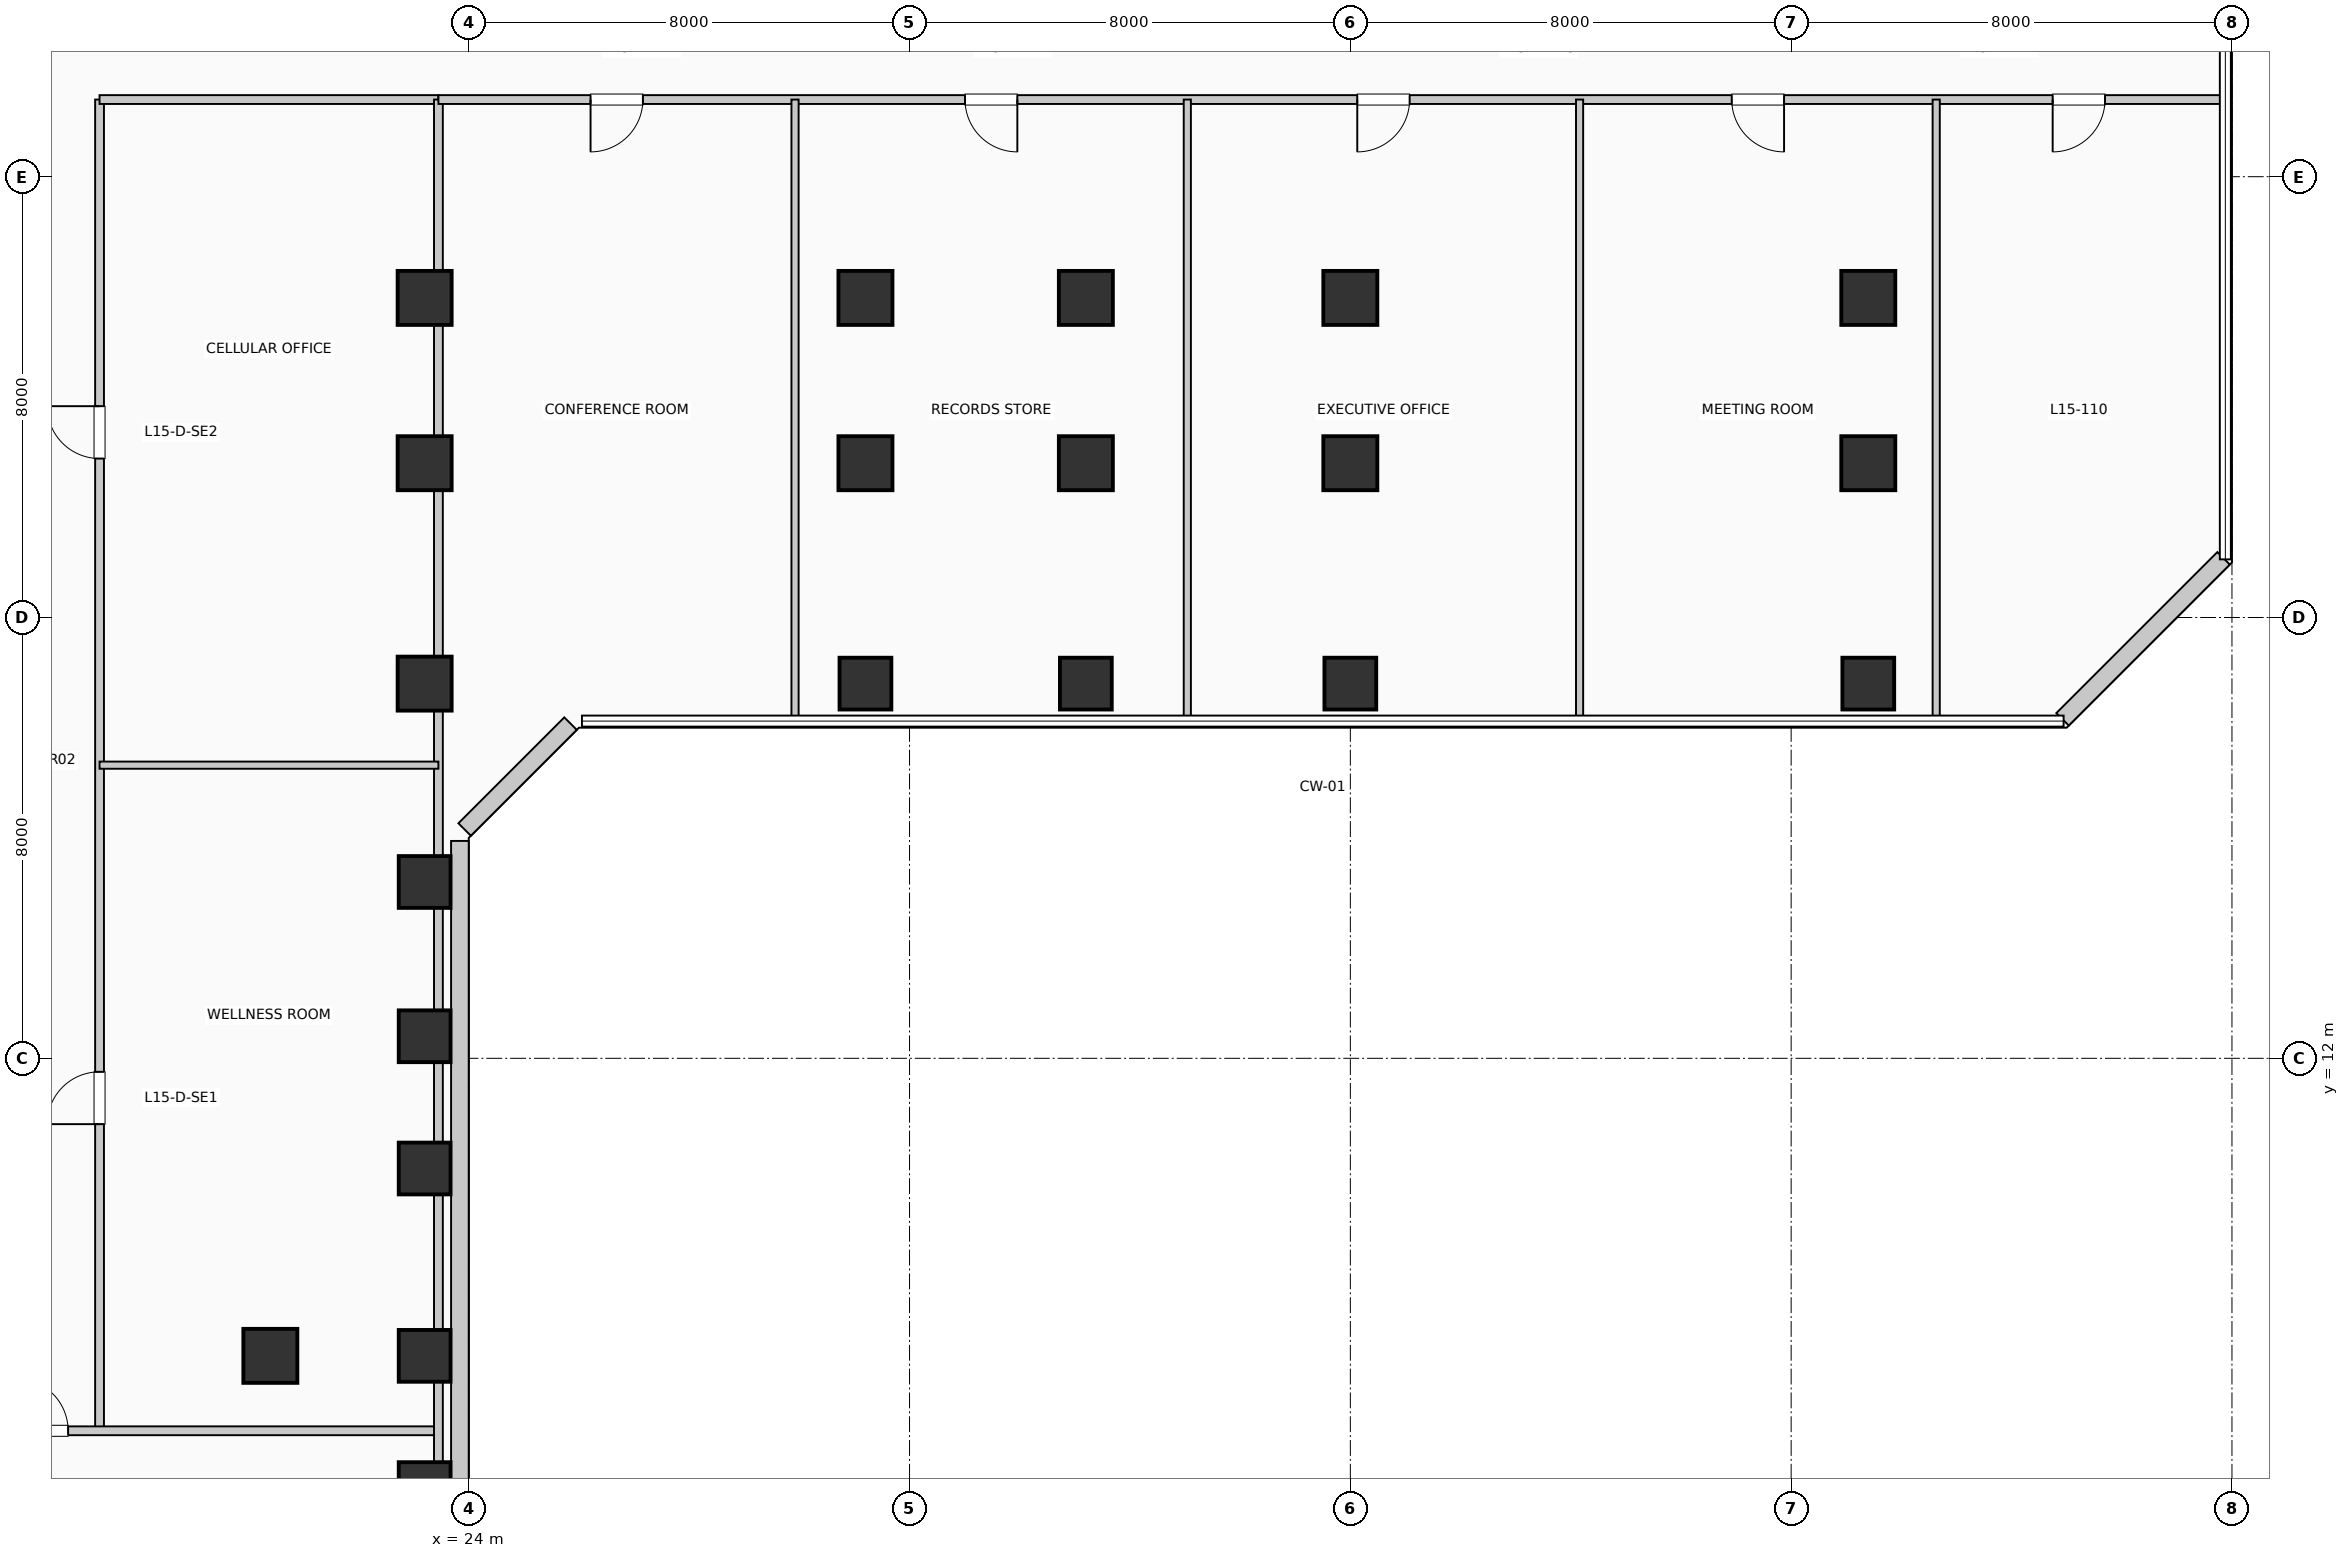
"""IFC4 building model, lengths in metres.
Left out: names, types, materials, properties, quantities, classifications, styles, units other than length and angle.
Written with IfcOpenShell. Run it as: python <this file> out.ifc"""

import sys

from ifc_helpers import new_model, si_unit, direction, frame, frame_2d, origin, origin_2d, place, context, subcontext, project, spatial, rectangle, extrude, element, fill, save


model = new_model("IFC4")
c1 = context("Model", 3, precision=1e-05, world=origin(), true_north=direction((0.0, 1.0)))
c2 = subcontext(c1, "Body", "Model", "MODEL_VIEW")
j1 = project(units=[si_unit("LENGTHUNIT", "METRE"), si_unit("PLANEANGLEUNIT", "RADIAN")], contexts=[c1])
p1 = place(None, origin())
s1 = spatial("IfcSite", under=j1, at=p1, CompositionType="ELEMENT")
p2 = place(p1, origin())
s2 = spatial("IfcBuilding", under=s1, at=p2, CompositionType="ELEMENT")
p3 = place(p2, frame((0.0, 0.0, 66.0)))
s3 = spatial("IfcBuildingStorey", under=s2, at=p3, CompositionType="ELEMENT", Elevation=66.0)
p4 = place(p3, frame((20.4, 6.6, 0.0), z_axis=(0.0, 0.0, 1.0), x_axis=(1.0, 0.0, 0.0)))
e1 = element("IfcColumn", 1, at=p4, inside=s3, PredefinedType="COLUMN", context=c2, shape_type="SweptSolid", body=[
    extrude(rectangle(XDim=0.98, YDim=0.98, at=origin_2d()), origin(), (0.0, 0.0, 1.0), 3.96),
])
for number, where, z_axis, x_axis in (
    (2, (23.2, 4.2, 0.0), (0.0, 0.0, 1.0), (1.0, 0.0, 0.0)),
    (3, (23.2, 6.6, 0.0), (0.0, 0.0, 1.0), (1.0, 0.0, 0.0)),
    (4, (23.2, 10.0, 0.0), (0.0, 0.0, 1.0), (1.0, 0.0, 0.0)),
    (5, (23.2, 12.4, 0.0), (0.0, 0.0, 1.0), (1.0, 0.0, 0.0)),
    (6, (23.2, 15.2, 0.0), (0.0, 0.0, 1.0), (1.0, 0.0, 0.0)),
):
    element("IfcColumn", number, at=place(p3, frame(where, z_axis=z_axis, x_axis=x_axis)), inside=s3, PredefinedType="COLUMN", context=c2, shape_type="SweptSolid", body=[
        extrude(rectangle(XDim=0.94, YDim=0.94, at=origin_2d()), origin(), (0.0, 0.0, 1.0), 3.96),
    ])
for number, where, z_axis, x_axis in (
    (7, (23.2, 18.8, 0.0), (0.0, 0.0, 1.0), (1.0, 0.0, 0.0)),
    (8, (23.2, 22.8, 0.0), (0.0, 0.0, 1.0), (1.0, 0.0, 0.0)),
    (9, (23.2, 25.8, 0.0), (0.0, 0.0, 1.0), (1.0, 0.0, 0.0)),
):
    element("IfcColumn", number, at=place(p3, frame(where, z_axis=z_axis, x_axis=x_axis)), inside=s3, PredefinedType="COLUMN", context=c2, shape_type="SweptSolid", body=[
        extrude(rectangle(XDim=0.98, YDim=0.98, at=origin_2d()), origin(), (0.0, 0.0, 1.0), 3.96),
    ])
p5 = place(p3, frame((31.2, 18.8, 0.0), z_axis=(0.0, 0.0, 1.0), x_axis=(1.0, 0.0, 0.0)))
e10 = element("IfcColumn", 10, at=p5, inside=s3, PredefinedType="COLUMN", context=c2, shape_type="SweptSolid", body=[
    extrude(rectangle(XDim=0.94, YDim=0.94, at=origin_2d()), origin(), (0.0, 0.0, 1.0), 3.96),
])
for number, where, z_axis, x_axis in (
    (11, (31.2, 22.8, 0.0), (0.0, 0.0, 1.0), (1.0, 0.0, 0.0)),
    (12, (31.2, 25.8, 0.0), (0.0, 0.0, 1.0), (1.0, 0.0, 0.0)),
):
    element("IfcColumn", number, at=place(p3, frame(where, z_axis=z_axis, x_axis=x_axis)), inside=s3, PredefinedType="COLUMN", context=c2, shape_type="SweptSolid", body=[
        extrude(rectangle(XDim=0.98, YDim=0.98, at=origin_2d()), origin(), (0.0, 0.0, 1.0), 3.96),
    ])
p6 = place(p3, frame((35.2, 18.8, 0.0), z_axis=(0.0, 0.0, 1.0), x_axis=(1.0, 0.0, 0.0)))
e13 = element("IfcColumn", 13, at=p6, inside=s3, PredefinedType="COLUMN", context=c2, shape_type="SweptSolid", body=[
    extrude(rectangle(XDim=0.94, YDim=0.94, at=origin_2d()), origin(), (0.0, 0.0, 1.0), 3.96),
])
for number, where, z_axis, x_axis in (
    (14, (35.2, 22.8, 0.0), (0.0, 0.0, 1.0), (1.0, 0.0, 0.0)),
    (15, (35.2, 25.8, 0.0), (0.0, 0.0, 1.0), (1.0, 0.0, 0.0)),
):
    element("IfcColumn", number, at=place(p3, frame(where, z_axis=z_axis, x_axis=x_axis)), inside=s3, PredefinedType="COLUMN", context=c2, shape_type="SweptSolid", body=[
        extrude(rectangle(XDim=0.98, YDim=0.98, at=origin_2d()), origin(), (0.0, 0.0, 1.0), 3.96),
    ])
p7 = place(p3, frame((40.0, 18.8, 0.0), z_axis=(0.0, 0.0, 1.0), x_axis=(1.0, 0.0, 0.0)))
e16 = element("IfcColumn", 16, at=p7, inside=s3, PredefinedType="COLUMN", context=c2, shape_type="SweptSolid", body=[
    extrude(rectangle(XDim=0.94, YDim=0.94, at=origin_2d()), origin(), (0.0, 0.0, 1.0), 3.96),
])
for number, where, z_axis, x_axis in (
    (17, (40.0, 22.8, 0.0), (0.0, 0.0, 1.0), (1.0, 0.0, 0.0)),
    (18, (40.0, 25.8, 0.0), (0.0, 0.0, 1.0), (1.0, 0.0, 0.0)),
):
    element("IfcColumn", number, at=place(p3, frame(where, z_axis=z_axis, x_axis=x_axis)), inside=s3, PredefinedType="COLUMN", context=c2, shape_type="SweptSolid", body=[
        extrude(rectangle(XDim=0.98, YDim=0.98, at=origin_2d()), origin(), (0.0, 0.0, 1.0), 3.96),
    ])
p8 = place(p3, frame((49.4, 18.8, 0.0), z_axis=(0.0, 0.0, 1.0), x_axis=(1.0, 0.0, 0.0)))
e19 = element("IfcColumn", 19, at=p8, inside=s3, PredefinedType="COLUMN", context=c2, shape_type="SweptSolid", body=[
    extrude(rectangle(XDim=0.94, YDim=0.94, at=origin_2d()), origin(), (0.0, 0.0, 1.0), 3.96),
])
for number, where, z_axis, x_axis in (
    (20, (49.4, 22.8, 0.0), (0.0, 0.0, 1.0), (1.0, 0.0, 0.0)),
    (21, (49.4, 25.8, 0.0), (0.0, 0.0, 1.0), (1.0, 0.0, 0.0)),
):
    element("IfcColumn", number, at=place(p3, frame(where, z_axis=z_axis, x_axis=x_axis)), inside=s3, PredefinedType="COLUMN", context=c2, shape_type="SweptSolid", body=[
        extrude(rectangle(XDim=0.98, YDim=0.98, at=origin_2d()), origin(), (0.0, 0.0, 1.0), 3.96),
    ])
p9 = place(p3, frame((23.84, 3.055, 0.0), z_axis=(0.0, 0.0, 1.0), x_axis=(0.0, 1.0, 0.0)))
e22 = element("IfcWall", 22, at=p9, inside=s3, PredefinedType="SOLIDWALL", context=c2, shape_type="SweptSolid", body=[
    extrude(rectangle(XDim=12.89, YDim=0.32, at=frame_2d((6.445, 0.0))), origin(), (0.0, 0.0, 1.0), 3.71),
])
p10 = place(p3, frame((23.926, 16.152, 0.0), z_axis=(0.0, 0.0, 1.0), x_axis=(0.707106781187, 0.707106781187, 0.0)))
e23 = element("IfcWall", 23, at=p10, inside=s3, PredefinedType="SOLIDWALL", context=c2, shape_type="SweptSolid", body=[
    extrude(rectangle(XDim=2.718, YDim=0.32, at=frame_2d((1.359, 0.0))), origin(), (0.0, 0.0, 1.0), 3.71),
])
p11 = place(p3, frame((52.926, 18.152, 0.0), z_axis=(0.0, 0.0, 1.0), x_axis=(0.707106781187, 0.707106781187, 0.0)))
e24 = element("IfcWall", 24, at=p11, inside=s3, PredefinedType="SOLIDWALL", context=c2, shape_type="SweptSolid", body=[
    extrude(rectangle(XDim=4.133, YDim=0.32, at=frame_2d((2.066, 0.0))), origin(), (0.0, 0.0, 1.0), 3.71),
])
p12 = place(p3, frame((17.3, 5.24, 0.0), z_axis=(0.0, 0.0, 1.0), x_axis=(0.0, 1.0, 0.0)))
e25 = element("IfcWall", 25, at=p12, inside=s3, PredefinedType="PARTITIONING", context=c2, shape_type="SweptSolid", body=[
    extrude(rectangle(XDim=24.16, YDim=0.16, at=frame_2d((12.08, 0.0))), origin(), (0.0, 0.0, 1.0), 3.71),
])
p13 = place(p12, frame((5.565, 0.0, 0.0)))
e26 = element("IfcOpeningElement", 26, at=p13, cuts=e25, PredefinedType="OPENING", context=c2, shape_type="SweptSolid", body=[
    extrude(rectangle(XDim=0.95, YDim=2.15, at=frame_2d((0.475, 1.075))), frame((0.0, 0.09, 0.0), z_axis=(0.0, -1.0, 0.0), x_axis=(1.0, 0.0, 0.0)), (0.0, 0.0, 1.0), 0.18),
])
p14 = place(p12, frame((17.645, 0.0, 0.0)))
e27 = element("IfcOpeningElement", 27, at=p14, cuts=e25, PredefinedType="OPENING", context=c2, shape_type="SweptSolid", body=[
    extrude(rectangle(XDim=0.95, YDim=2.15, at=frame_2d((0.475, 1.075))), frame((0.0, 0.09, 0.0), z_axis=(0.0, -1.0, 0.0), x_axis=(1.0, 0.0, 0.0)), (0.0, 0.0, 1.0), 0.18),
])
p15 = place(p3, frame((0.19, 5.24, 0.0), z_axis=(0.0, 0.0, 1.0), x_axis=(1.0, 0.0, 0.0)))
e28 = element("IfcWall", 28, at=p15, inside=s3, PredefinedType="PARTITIONING", context=c2, shape_type="SweptSolid", body=[
    extrude(rectangle(XDim=23.26, YDim=0.16, at=frame_2d((11.63, 0.0))), origin(), (0.0, 0.0, 1.0), 3.71),
])
p16 = place(p15, frame((15.59, 0.0, 0.0)))
e29 = element("IfcOpeningElement", 29, at=p16, cuts=e28, PredefinedType="OPENING", context=c2, shape_type="SweptSolid", body=[
    extrude(rectangle(XDim=0.95, YDim=2.15, at=frame_2d((0.475, 1.075))), frame((0.0, 0.09, 0.0), z_axis=(0.0, -1.0, 0.0), x_axis=(1.0, 0.0, 0.0)), (0.0, 0.0, 1.0), 0.18),
])
p17 = place(p3, frame((17.3, 29.4, 0.0), z_axis=(0.0, 0.0, 1.0), x_axis=(1.0, 0.0, 0.0)))
e30 = element("IfcWall", 30, at=p17, inside=s3, PredefinedType="PARTITIONING", context=c2, shape_type="SweptSolid", body=[
    extrude(rectangle(XDim=6.15, YDim=0.16, at=frame_2d((3.075, 0.0))), origin(), (0.0, 0.0, 1.0), 3.71),
])
p18 = place(p3, frame((23.45, 1.04, 0.0), z_axis=(0.0, 0.0, 1.0), x_axis=(0.0, 1.0, 0.0)))
e31 = element("IfcWall", 31, at=p18, inside=s3, PredefinedType="PARTITIONING", context=c2, shape_type="SweptSolid", body=[
    extrude(rectangle(XDim=28.36, YDim=0.16, at=frame_2d((14.18, 0.0))), origin(), (0.0, 0.0, 1.0), 2.995),
])
p19 = place(p3, frame((17.3, 17.32, 0.0), z_axis=(0.0, 0.0, 1.0), x_axis=(1.0, 0.0, 0.0)))
e32 = element("IfcWall", 32, at=p19, inside=s3, PredefinedType="PARTITIONING", context=c2, shape_type="SweptSolid", body=[
    extrude(rectangle(XDim=6.15, YDim=0.13, at=frame_2d((3.075, 0.0))), origin(), (0.0, 0.0, 1.0), 3.71),
])
p20 = place(p3, frame((23.45, 29.4, 0.0), z_axis=(0.0, 0.0, 1.0), x_axis=(1.0, 0.0, 0.0)))
e33 = element("IfcWall", 33, at=p20, inside=s3, PredefinedType="PARTITIONING", context=c2, shape_type="SweptSolid", body=[
    extrude(rectangle(XDim=32.36, YDim=0.16, at=frame_2d((16.18, 0.0))), origin(), (0.0, 0.0, 1.0), 3.365),
])
p21 = place(p20, frame((3.711, 0.0, 0.0), z_axis=(0.0, 0.0, 1.0), x_axis=(-1.0, 0.0, 0.0)))
e34 = element("IfcOpeningElement", 34, at=p21, cuts=e33, PredefinedType="OPENING", context=c2, shape_type="SweptSolid", body=[
    extrude(rectangle(XDim=0.95, YDim=2.15, at=frame_2d((0.475, 1.075))), frame((0.0, 0.09, 0.0), z_axis=(0.0, -1.0, 0.0), x_axis=(1.0, 0.0, 0.0)), (0.0, 0.0, 1.0), 0.18),
])
p22 = place(p20, frame((10.507, 0.0, 0.0), z_axis=(0.0, 0.0, 1.0), x_axis=(-1.0, 0.0, 0.0)))
e35 = element("IfcOpeningElement", 35, at=p22, cuts=e33, PredefinedType="OPENING", context=c2, shape_type="SweptSolid", body=[
    extrude(rectangle(XDim=0.95, YDim=2.15, at=frame_2d((0.475, 1.075))), frame((0.0, 0.09, 0.0), z_axis=(0.0, -1.0, 0.0), x_axis=(1.0, 0.0, 0.0)), (0.0, 0.0, 1.0), 0.18),
])
p23 = place(p20, frame((17.626, 0.0, 0.0), z_axis=(0.0, 0.0, 1.0), x_axis=(-1.0, 0.0, 0.0)))
e36 = element("IfcOpeningElement", 36, at=p23, cuts=e33, PredefinedType="OPENING", context=c2, shape_type="SweptSolid", body=[
    extrude(rectangle(XDim=0.95, YDim=2.15, at=frame_2d((0.475, 1.075))), frame((0.0, 0.09, 0.0), z_axis=(0.0, -1.0, 0.0), x_axis=(1.0, 0.0, 0.0)), (0.0, 0.0, 1.0), 0.18),
])
p24 = place(p20, frame((24.421, 0.0, 0.0), z_axis=(0.0, 0.0, 1.0), x_axis=(-1.0, 0.0, 0.0)))
e37 = element("IfcOpeningElement", 37, at=p24, cuts=e33, PredefinedType="OPENING", context=c2, shape_type="SweptSolid", body=[
    extrude(rectangle(XDim=0.95, YDim=2.15, at=frame_2d((0.475, 1.075))), frame((0.0, 0.09, 0.0), z_axis=(0.0, -1.0, 0.0), x_axis=(1.0, 0.0, 0.0)), (0.0, 0.0, 1.0), 0.18),
])
p25 = place(p20, frame((30.246, 0.0, 0.0), z_axis=(0.0, 0.0, 1.0), x_axis=(-1.0, 0.0, 0.0)))
e38 = element("IfcOpeningElement", 38, at=p25, cuts=e33, PredefinedType="OPENING", context=c2, shape_type="SweptSolid", body=[
    extrude(rectangle(XDim=0.95, YDim=2.15, at=frame_2d((0.475, 1.075))), frame((0.0, 0.09, 0.0), z_axis=(0.0, -1.0, 0.0), x_axis=(1.0, 0.0, 0.0)), (0.0, 0.0, 1.0), 0.18),
])
for number, where, z_axis, x_axis in (
    (39, (29.922, 18.19, 0.0), (0.0, 0.0, 1.0), (0.0, 1.0, 0.0)),
    (40, (37.041, 18.19, 0.0), (0.0, 0.0, 1.0), (0.0, 1.0, 0.0)),
    (41, (44.16, 18.19, 0.0), (0.0, 0.0, 1.0), (0.0, 1.0, 0.0)),
    (42, (50.632, 18.19, 0.0), (0.0, 0.0, 1.0), (0.0, 1.0, 0.0)),
):
    element("IfcWall", number, at=place(p3, frame(where, z_axis=z_axis, x_axis=x_axis)), inside=s3, PredefinedType="PARTITIONING", context=c2, shape_type="SweptSolid", body=[
        extrude(rectangle(XDim=11.21, YDim=0.13, at=frame_2d((5.605, 0.0))), origin(), (0.0, 0.0, 1.0), 3.71),
    ])
p26 = place(p16, origin())
e43 = element("IfcDoor", 43, at=p26, inside=s3, OperationType="SINGLE_SWING_LEFT", PredefinedType="DOOR", context=c2, shape_type="SweptSolid", body=[
    extrude(rectangle(XDim=0.95, YDim=2.15, at=frame_2d((0.475, 1.075))), frame((0.0, 0.025, 0.0), z_axis=(0.0, -1.0, 0.0), x_axis=(1.0, 0.0, 0.0)), (0.0, 0.0, 1.0), 0.05),
])
fill(e29, e43)
p27 = place(p13, origin())
e44 = element("IfcDoor", 44, at=p27, inside=s3, OperationType="SINGLE_SWING_LEFT", PredefinedType="DOOR", context=c2, shape_type="SweptSolid", body=[
    extrude(rectangle(XDim=0.95, YDim=2.15, at=frame_2d((0.475, 1.075))), frame((0.0, 0.025, 0.0), z_axis=(0.0, -1.0, 0.0), x_axis=(1.0, 0.0, 0.0)), (0.0, 0.0, 1.0), 0.05),
])
fill(e26, e44)
p28 = place(p14, origin())
e45 = element("IfcDoor", 45, at=p28, inside=s3, OperationType="SINGLE_SWING_RIGHT", PredefinedType="DOOR", context=c2, shape_type="SweptSolid", body=[
    extrude(rectangle(XDim=0.95, YDim=2.15, at=frame_2d((0.475, 1.075))), frame((0.0, 0.025, 0.0), z_axis=(0.0, -1.0, 0.0), x_axis=(1.0, 0.0, 0.0)), (0.0, 0.0, 1.0), 0.05),
])
fill(e27, e45)
p29 = place(p21, origin())
e46 = element("IfcDoor", 46, at=p29, inside=s3, OperationType="SINGLE_SWING_LEFT", PredefinedType="DOOR", context=c2, shape_type="SweptSolid", body=[
    extrude(rectangle(XDim=0.95, YDim=2.15, at=frame_2d((0.475, 1.075))), frame((0.0, 0.025, 0.0), z_axis=(0.0, -1.0, 0.0), x_axis=(1.0, 0.0, 0.0)), (0.0, 0.0, 1.0), 0.05),
])
fill(e34, e46)
p30 = place(p22, origin())
e47 = element("IfcDoor", 47, at=p30, inside=s3, OperationType="SINGLE_SWING_RIGHT", PredefinedType="DOOR", context=c2, shape_type="SweptSolid", body=[
    extrude(rectangle(XDim=0.95, YDim=2.15, at=frame_2d((0.475, 1.075))), frame((0.0, 0.025, 0.0), z_axis=(0.0, -1.0, 0.0), x_axis=(1.0, 0.0, 0.0)), (0.0, 0.0, 1.0), 0.05),
])
fill(e35, e47)
p31 = place(p23, origin())
e48 = element("IfcDoor", 48, at=p31, inside=s3, OperationType="SINGLE_SWING_LEFT", PredefinedType="DOOR", context=c2, shape_type="SweptSolid", body=[
    extrude(rectangle(XDim=0.95, YDim=2.15, at=frame_2d((0.475, 1.075))), frame((0.0, 0.025, 0.0), z_axis=(0.0, -1.0, 0.0), x_axis=(1.0, 0.0, 0.0)), (0.0, 0.0, 1.0), 0.05),
])
fill(e36, e48)
p32 = place(p24, origin())
e49 = element("IfcDoor", 49, at=p32, inside=s3, OperationType="SINGLE_SWING_RIGHT", PredefinedType="DOOR", context=c2, shape_type="SweptSolid", body=[
    extrude(rectangle(XDim=0.95, YDim=2.15, at=frame_2d((0.475, 1.075))), frame((0.0, 0.025, 0.0), z_axis=(0.0, -1.0, 0.0), x_axis=(1.0, 0.0, 0.0)), (0.0, 0.0, 1.0), 0.05),
])
fill(e37, e49)
p33 = place(p25, origin())
e50 = element("IfcDoor", 50, at=p33, inside=s3, OperationType="SINGLE_SWING_LEFT", PredefinedType="DOOR", context=c2, shape_type="SweptSolid", body=[
    extrude(rectangle(XDim=0.95, YDim=2.15, at=frame_2d((0.475, 1.075))), frame((0.0, 0.025, 0.0), z_axis=(0.0, -1.0, 0.0), x_axis=(1.0, 0.0, 0.0)), (0.0, 0.0, 1.0), 0.05),
])
fill(e38, e50)
save(model, sys.argv[1])
